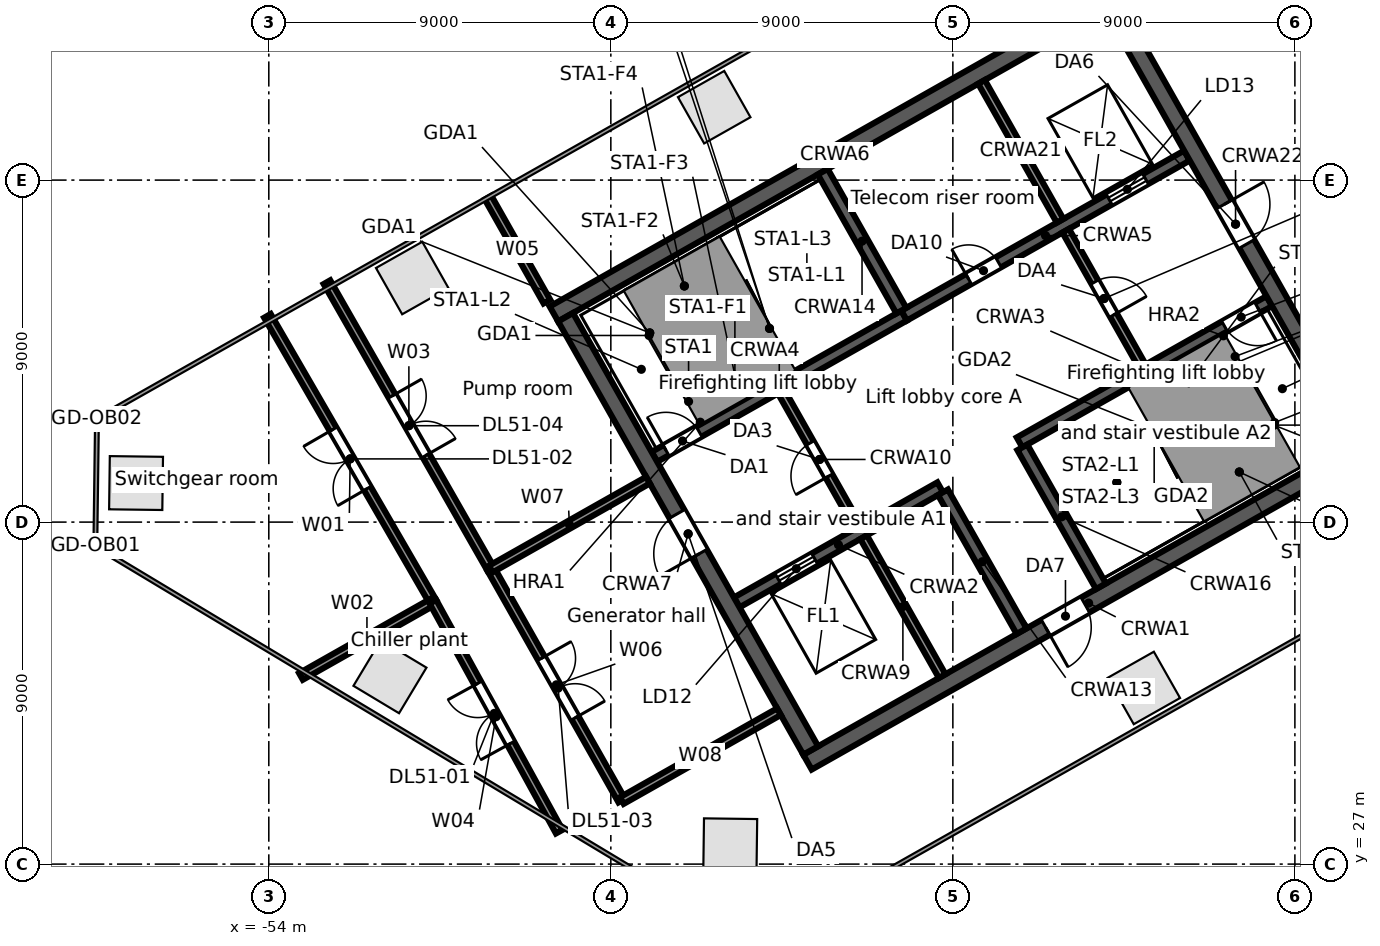
"""IFC4 building model, lengths in metres.
Left out: names, types, materials, properties, quantities, classifications, styles, units other than length and angle.
Written with IfcOpenShell. Run it as: python <this file> out.ifc"""

import sys

from ifc_helpers import new_model, si_unit, direction, frame, frame_2d, origin, origin_2d, place, context, subcontext, project, spatial, rectangle, extrude, element, fill, save


model = new_model("IFC4")
c1 = context("Model", 3, precision=1e-05, world=origin(), true_north=direction((0.0, 1.0)))
c2 = subcontext(c1, "Body", "Model", "MODEL_VIEW")
j1 = project(units=[si_unit("LENGTHUNIT", "METRE"), si_unit("PLANEANGLEUNIT", "RADIAN")], contexts=[c1])
p1 = place(None, origin())
s1 = spatial("IfcSite", under=j1, at=p1, CompositionType="ELEMENT")
p2 = place(p1, origin())
s2 = spatial("IfcBuilding", under=s1, at=p2, CompositionType="ELEMENT")
p3 = place(p2, frame((0.0, 0.0, 230.9)))
s3 = spatial("IfcBuildingStorey", under=s2, at=p3, CompositionType="ELEMENT", Elevation=230.9)
for number, where, z_axis, x_axis in (
    (1, (-42.28, 46.919, 0.0), (0.0, 0.0, 1.0), (-0.87, -0.492, 0.0)),
    (2, (-50.226, 42.423, 0.0), (0.0, 0.0, 1.0), (-0.87, -0.492, 0.0)),
    (3, (-57.493, 37.027, 0.0), (0.0, 0.0, 1.0), (-0.013, -1.0, 0.0)),
    (4, (-50.812, 31.931, 0.0), (0.0, 0.0, 1.0), (0.857, -0.515, 0.0)),
    (5, (-41.858, 27.495, 0.0), (0.0, 0.0, 1.0), (1.0, -0.013, 0.0)),
    (6, (-30.976, 31.635, 0.0), (0.0, 0.0, 1.0), (0.87, 0.492, 0.0)),
):
    element("IfcColumn", number, at=place(p3, frame(where, z_axis=z_axis, x_axis=x_axis)), inside=s3, PredefinedType="COLUMN", context=c2, shape_type="SweptSolid", body=[
        extrude(rectangle(XDim=1.4, YDim=1.4, at=origin_2d()), origin(), (0.0, 0.0, 1.0), 7.8),
    ])
p4 = place(p3, frame((-39.825, 29.684, 0.0), z_axis=(0.0, 0.0, 1.0), x_axis=(0.870353598469, 0.492427267353, 0.0)))
e7 = element("IfcWall", 7, at=p4, inside=s3, PredefinedType="SOLIDWALL", context=c2, shape_type="SweptSolid", body=[
    extrude(rectangle(XDim=17.0, YDim=0.45, at=frame_2d((8.5, 0.0))), origin(), (0.0, 0.0, 1.0), 7.52),
])
p5 = place(p4, frame((7.2, 0.0, 0.0)))
e8 = element("IfcOpeningElement", 8, at=p5, cuts=e7, PredefinedType="OPENING", context=c2, shape_type="SweptSolid", body=[
    extrude(rectangle(XDim=1.2, YDim=2.1, at=frame_2d((0.6, 1.05))), frame((0.0, 0.235, 0.0), z_axis=(0.0, -1.0, 0.0), x_axis=(1.0, 0.0, 0.0)), (0.0, 0.0, 1.0), 0.47),
])
p6 = place(p3, frame((-41.687, 33.887, 0.0), z_axis=(0.0, 0.0, 1.0), x_axis=(0.870355736587, 0.49242348826, 0.0)))
e9 = element("IfcWall", 9, at=p6, inside=s3, PredefinedType="SOLIDWALL", context=c2, shape_type="SweptSolid", body=[
    extrude(rectangle(XDim=6.15, YDim=0.3, at=frame_2d((3.075, 0.0))), origin(), (0.0, 0.0, 1.0), 7.52),
])
p7 = place(p6, frame((1.25, 0.0, 0.0)))
e10 = element("IfcOpeningElement", 10, at=p7, cuts=e9, PredefinedType="OPENING", context=c2, shape_type="SweptSolid", body=[
    extrude(rectangle(XDim=1.1, YDim=2.1, at=frame_2d((0.55, 1.05))), frame((0.0, 0.16, 0.0), z_axis=(0.0, -1.0, 0.0), x_axis=(1.0, 0.0, 0.0)), (0.0, 0.0, 1.0), 0.32),
])
p8 = place(p3, frame((-34.245, 38.097, 0.0), z_axis=(0.0, 0.0, 1.0), x_axis=(0.870360409231, 0.492415229297, 0.0)))
e11 = element("IfcWall", 11, at=p8, inside=s3, PredefinedType="SOLIDWALL", context=c2, shape_type="SweptSolid", body=[
    extrude(rectangle(XDim=7.55, YDim=0.3, at=frame_2d((3.775, 0.0))), origin(), (0.0, 0.0, 1.0), 7.52),
])
p9 = place(p8, frame((6.2, 0.0, 0.0)))
e12 = element("IfcOpeningElement", 12, at=p9, cuts=e11, PredefinedType="OPENING", context=c2, shape_type="SweptSolid", body=[
    extrude(rectangle(XDim=1.0, YDim=2.1, at=frame_2d((0.5, 1.05))), frame((0.0, 0.16, 0.0), z_axis=(0.0, -1.0, 0.0), x_axis=(1.0, 0.0, 0.0)), (0.0, 0.0, 1.0), 0.32),
])
p10 = place(p3, frame((-43.853, 37.717, 0.0), z_axis=(0.0, 0.0, 1.0), x_axis=(0.870360409231, 0.492415229297, 0.0)))
e13 = element("IfcWall", 13, at=p10, inside=s3, PredefinedType="SOLIDWALL", context=c2, shape_type="SweptSolid", body=[
    extrude(rectangle(XDim=7.55, YDim=0.3, at=frame_2d((3.775, 0.0))), origin(), (0.0, 0.0, 1.0), 7.52),
])
p11 = place(p10, frame((0.35, 0.0, 0.0)))
e14 = element("IfcOpeningElement", 14, at=p11, cuts=e13, PredefinedType="OPENING", context=c2, shape_type="SweptSolid", body=[
    extrude(rectangle(XDim=1.0, YDim=2.1, at=frame_2d((0.5, 1.05))), frame((0.0, 0.16, 0.0), z_axis=(0.0, -1.0, 0.0), x_axis=(1.0, 0.0, 0.0)), (0.0, 0.0, 1.0), 0.32),
])
p12 = place(p3, frame((-37.282, 41.435, 0.0), z_axis=(0.0, 0.0, 1.0), x_axis=(0.870352688754, 0.492428875248, 0.0)))
e15 = element("IfcWall", 15, at=p12, inside=s3, PredefinedType="SOLIDWALL", context=c2, shape_type="SweptSolid", body=[
    extrude(rectangle(XDim=8.55, YDim=0.3, at=frame_2d((4.275, 0.0))), origin(), (0.0, 0.0, 1.0), 7.52),
])
p13 = place(p12, frame((6.2, 0.0, 0.0)))
e16 = element("IfcOpeningElement", 16, at=p13, cuts=e15, PredefinedType="OPENING", context=c2, shape_type="SweptSolid", body=[
    extrude(rectangle(XDim=1.1, YDim=2.1, at=frame_2d((0.55, 1.05))), frame((0.0, 0.16, 0.0), z_axis=(0.0, -1.0, 0.0), x_axis=(1.0, 0.0, 0.0)), (0.0, 0.0, 1.0), 0.32),
])
p14 = place(p12, frame((1.95, 0.0, 0.0)))
e17 = element("IfcOpeningElement", 17, at=p14, cuts=e15, PredefinedType="OPENING", context=c2, shape_type="SweptSolid", body=[
    extrude(rectangle(XDim=0.9, YDim=2.1, at=frame_2d((0.45, 1.05))), frame((0.0, 0.16, 0.0), z_axis=(0.0, -1.0, 0.0), x_axis=(1.0, 0.0, 0.0)), (0.0, 0.0, 1.0), 0.32),
])
p15 = place(p3, frame((-46.498, 41.477, 0.0), z_axis=(0.0, 0.0, 1.0), x_axis=(0.870359753402, 0.492416388494, 0.0)))
e18 = element("IfcWall", 18, at=p15, inside=s3, PredefinedType="SOLIDWALL", context=c2, shape_type="SweptSolid", body=[
    extrude(rectangle(XDim=17.0, YDim=0.45, at=frame_2d((8.5, 0.0))), origin(), (0.0, 0.0, 1.0), 7.52),
])
p16 = place(p3, frame((-46.191, 41.392, 0.0), z_axis=(0.0, 0.0, 1.0), x_axis=(0.492421378713, -0.870356930107, 0.0)))
e19 = element("IfcWall", 19, at=p16, inside=s3, PredefinedType="SOLIDWALL", context=c2, shape_type="SweptSolid", body=[
    extrude(rectangle(XDim=13.1, YDim=0.45, at=frame_2d((6.55, 0.0))), origin(), (0.0, 0.0, 1.0), 7.52),
])
p17 = place(p16, frame((5.95, 0.0, 0.0)))
e20 = element("IfcOpeningElement", 20, at=p17, cuts=e19, PredefinedType="OPENING", context=c2, shape_type="SweptSolid", body=[
    extrude(rectangle(XDim=1.2, YDim=2.1, at=frame_2d((0.6, 1.05))), frame((0.0, 0.235, 0.0), z_axis=(0.0, -1.0, 0.0), x_axis=(1.0, 0.0, 0.0)), (0.0, 0.0, 1.0), 0.47),
])
p18 = place(p3, frame((-38.349, 35.603, 0.0), z_axis=(0.0, 0.0, 1.0), x_axis=(0.492409653846, -0.870363563575, 0.0)))
e21 = element("IfcWall", 21, at=p18, inside=s3, PredefinedType="SOLIDWALL", context=c2, shape_type="SweptSolid", body=[
    extrude(rectangle(XDim=4.2, YDim=0.2, at=frame_2d((2.1, 0.0))), origin(), (0.0, 0.0, 1.0), 7.52),
])
p19 = place(p3, frame((-40.516, 39.433, 0.0), z_axis=(0.0, 0.0, 1.0), x_axis=(0.492453559952, -0.87033872216, 0.0)))
e22 = element("IfcWall", 22, at=p19, inside=s3, PredefinedType="PARTITIONING", context=c2, shape_type="SweptSolid", body=[
    extrude(rectangle(XDim=4.1, YDim=0.2, at=frame_2d((2.05, 0.0))), origin(), (0.0, 0.0, 1.0), 7.52),
])
p20 = place(p19, frame((1.55, 0.0, 0.0)))
e23 = element("IfcOpeningElement", 23, at=p20, cuts=e22, PredefinedType="OPENING", context=c2, shape_type="SweptSolid", body=[
    extrude(rectangle(XDim=1.0, YDim=2.1, at=frame_2d((0.5, 1.05))), frame((0.0, 0.11, 0.0), z_axis=(0.0, -1.0, 0.0), x_axis=(1.0, 0.0, 0.0)), (0.0, 0.0, 1.0), 0.22),
])
for number, where, z_axis, x_axis in (
    (24, (-36.26, 36.785, 0.0), (0.0, 0.0, 1.0), (0.492, -0.87, 0.0)),
    (25, (-39.424, 45.22, 0.0), (0.0, 0.0, 1.0), (0.492, -0.87, 0.0)),
    (26, (-34.171, 37.967, 0.0), (0.0, 0.0, 1.0), (0.492, -0.87, 0.0)),
):
    element("IfcWall", number, at=place(p3, frame(where, z_axis=z_axis, x_axis=x_axis)), inside=s3, PredefinedType="SOLIDWALL", context=c2, shape_type="SweptSolid", body=[
        extrude(rectangle(XDim=4.2, YDim=0.3, at=frame_2d((2.1, 0.0))), origin(), (0.0, 0.0, 1.0), 7.52),
    ])
p21 = place(p3, frame((-33.031, 43.667, 0.0), z_axis=(0.0, 0.0, 1.0), x_axis=(0.492408451753, -0.87036424366, 0.0)))
e27 = element("IfcWall", 27, at=p21, inside=s3, PredefinedType="PARTITIONING", context=c2, shape_type="SweptSolid", body=[
    extrude(rectangle(XDim=4.1, YDim=0.2, at=frame_2d((2.05, 0.0))), origin(), (0.0, 0.0, 1.0), 7.52),
])
p22 = place(p21, frame((1.55, 0.0, 0.0)))
e28 = element("IfcOpeningElement", 28, at=p22, cuts=e27, PredefinedType="OPENING", context=c2, shape_type="SweptSolid", body=[
    extrude(rectangle(XDim=1.0, YDim=2.1, at=frame_2d((0.5, 1.05))), frame((0.0, 0.11, 0.0), z_axis=(0.0, -1.0, 0.0), x_axis=(1.0, 0.0, 0.0)), (0.0, 0.0, 1.0), 0.22),
])
p23 = place(p3, frame((-35.246, 47.584, 0.0), z_axis=(0.0, 0.0, 1.0), x_axis=(0.492409653846, -0.870363563575, 0.0)))
e29 = element("IfcWall", 29, at=p23, inside=s3, PredefinedType="SOLIDWALL", context=c2, shape_type="SweptSolid", body=[
    extrude(rectangle(XDim=4.2, YDim=0.2, at=frame_2d((2.1, 0.0))), origin(), (0.0, 0.0, 1.0), 7.52),
])
p24 = place(p3, frame((-31.787, 49.542, 0.0), z_axis=(0.0, 0.0, 1.0), x_axis=(0.492421378713, -0.870356930107, 0.0)))
e30 = element("IfcWall", 30, at=p24, inside=s3, PredefinedType="SOLIDWALL", context=c2, shape_type="SweptSolid", body=[
    extrude(rectangle(XDim=13.1, YDim=0.45, at=frame_2d((6.55, 0.0))), origin(), (0.0, 0.0, 1.0), 7.52),
])
p25 = place(p24, frame((5.95, 0.0, 0.0)))
e31 = element("IfcOpeningElement", 31, at=p25, cuts=e30, PredefinedType="OPENING", context=c2, shape_type="SweptSolid", body=[
    extrude(rectangle(XDim=1.2, YDim=2.1, at=frame_2d((0.6, 1.05))), frame((0.0, 0.235, 0.0), z_axis=(0.0, -1.0, 0.0), x_axis=(1.0, 0.0, 0.0)), (0.0, 0.0, 1.0), 0.47),
])
p26 = place(p3, frame((-54.036, 41.428, 0.0), z_axis=(0.0, 0.0, 1.0), x_axis=(0.500903434797, -0.865503176775, 0.0)))
e32 = element("IfcWall", 32, at=p26, inside=s3, PredefinedType="PARTITIONING", context=c2, shape_type="SweptSolid", body=[
    extrude(rectangle(XDim=8.694, YDim=0.2, at=frame_2d((4.347, 0.0))), origin(), (0.0, 0.0, 1.0), 6.894),
])
p27 = place(p26, frame((3.45, 0.0, 0.0)))
e33 = element("IfcOpeningElement", 33, at=p27, cuts=e32, PredefinedType="OPENING", context=c2, shape_type="SweptSolid", body=[
    extrude(rectangle(XDim=1.8, YDim=2.1, at=frame_2d((0.9, 1.05))), frame((0.0, 0.11, 0.0), z_axis=(0.0, -1.0, 0.0), x_axis=(1.0, 0.0, 0.0)), (0.0, 0.0, 1.0), 0.22),
])
p28 = place(p3, frame((-53.154, 31.938, 0.0), z_axis=(0.0, 0.0, 1.0), x_axis=(0.870347398057, 0.492438226273, 0.0)))
e34 = element("IfcWall", 34, at=p28, inside=s3, PredefinedType="PARTITIONING", context=c2, shape_type="SweptSolid", body=[
    extrude(rectangle(XDim=3.99, YDim=0.2, at=frame_2d((1.995, 0.0))), origin(), (0.0, 0.0, 1.0), 6.9),
])
p29 = place(p3, frame((-52.47, 42.314, 0.0), z_axis=(0.0, 0.0, 1.0), x_axis=(0.495939345118, -0.868357164975, 0.0)))
e35 = element("IfcWall", 35, at=p29, inside=s3, PredefinedType="PARTITIONING", context=c2, shape_type="SweptSolid", body=[
    extrude(rectangle(XDim=8.695, YDim=0.2, at=frame_2d((4.347, 0.0))), origin(), (0.0, 0.0, 1.0), 6.894),
])
p30 = place(p29, frame((3.45, 0.0, 0.0)))
e36 = element("IfcOpeningElement", 36, at=p30, cuts=e35, PredefinedType="OPENING", context=c2, shape_type="SweptSolid", body=[
    extrude(rectangle(XDim=1.8, YDim=2.1, at=frame_2d((0.9, 1.05))), frame((0.0, 0.11, 0.0), z_axis=(0.0, -1.0, 0.0), x_axis=(1.0, 0.0, 0.0)), (0.0, 0.0, 1.0), 0.22),
])
p31 = place(p3, frame((-49.681, 33.903, 0.0), z_axis=(0.0, 0.0, 1.0), x_axis=(0.48158332994, -0.876400305981, 0.0)))
e37 = element("IfcWall", 37, at=p31, inside=s3, PredefinedType="PARTITIONING", context=c2, shape_type="SweptSolid", body=[
    extrude(rectangle(XDim=6.902, YDim=0.2, at=frame_2d((3.451, 0.0))), origin(), (0.0, 0.0, 1.0), 6.8),
])
p32 = place(p31, frame((2.45, 0.0, 0.0)))
e38 = element("IfcOpeningElement", 38, at=p32, cuts=e37, PredefinedType="OPENING", context=c2, shape_type="SweptSolid", body=[
    extrude(rectangle(XDim=1.8, YDim=2.1, at=frame_2d((0.9, 1.05))), frame((0.0, 0.11, 0.0), z_axis=(0.0, -1.0, 0.0), x_axis=(1.0, 0.0, 0.0)), (0.0, 0.0, 1.0), 0.22),
])
p33 = place(p3, frame((-48.231, 44.54, 0.0), z_axis=(0.0, 0.0, 1.0), x_axis=(0.49254830201, -0.870285108563, 0.0)))
e39 = element("IfcWall", 39, at=p33, inside=s3, PredefinedType="PARTITIONING", context=c2, shape_type="SweptSolid", body=[
    extrude(rectangle(XDim=3.145, YDim=0.2, at=frame_2d((1.573, 0.0))), origin(), (0.0, 0.0, 1.0), 6.888),
])
p34 = place(p3, frame((-48.158, 34.764, 0.0), z_axis=(0.0, 0.0, 1.0), x_axis=(0.492472114048, -0.870328223652, 0.0)))
e40 = element("IfcWall", 40, at=p34, inside=s3, PredefinedType="PARTITIONING", context=c2, shape_type="SweptSolid", body=[
    extrude(rectangle(XDim=7.0, YDim=0.2, at=frame_2d((3.5, 0.0))), origin(), (0.0, 0.0, 1.0), 6.8),
])
p35 = place(p34, frame((2.7, 0.0, 0.0)))
e41 = element("IfcOpeningElement", 41, at=p35, cuts=e40, PredefinedType="OPENING", context=c2, shape_type="SweptSolid", body=[
    extrude(rectangle(XDim=1.8, YDim=2.1, at=frame_2d((0.9, 1.05))), frame((0.0, 0.11, 0.0), z_axis=(0.0, -1.0, 0.0), x_axis=(1.0, 0.0, 0.0)), (0.0, 0.0, 1.0), 0.22),
])
for number, where, z_axis, x_axis in (
    (42, (-48.158, 34.764, 0.0), (0.0, 0.0, 1.0), (0.87, 0.492, 0.0)),
    (43, (-44.711, 28.672, 0.0), (0.0, 0.0, 1.0), (0.87, 0.492, 0.0)),
):
    element("IfcWall", number, at=place(p3, frame(where, z_axis=z_axis, x_axis=x_axis)), inside=s3, PredefinedType="PARTITIONING", context=c2, shape_type="SweptSolid", body=[
        extrude(rectangle(XDim=4.751, YDim=0.2, at=frame_2d((2.375, 0.0))), origin(), (0.0, 0.0, 1.0), 6.8),
    ])
p36 = place(p13, origin())
e44 = element("IfcDoor", 44, at=p36, inside=s3, OperationType="DOUBLE_DOOR_SLIDING", PredefinedType="DOOR", context=c2, shape_type="SweptSolid", body=[
    extrude(rectangle(XDim=1.1, YDim=2.1, at=frame_2d((0.55, 1.05))), frame((0.0, 0.025, 0.0), z_axis=(0.0, -1.0, 0.0), x_axis=(1.0, 0.0, 0.0)), (0.0, 0.0, 1.0), 0.05),
])
fill(e16, e44)
p37 = place(p7, origin())
e45 = element("IfcDoor", 45, at=p37, inside=s3, OperationType="DOUBLE_DOOR_SLIDING", PredefinedType="DOOR", context=c2, shape_type="SweptSolid", body=[
    extrude(rectangle(XDim=1.1, YDim=2.1, at=frame_2d((0.55, 1.05))), frame((0.0, 0.025, 0.0), z_axis=(0.0, -1.0, 0.0), x_axis=(1.0, 0.0, 0.0)), (0.0, 0.0, 1.0), 0.05),
])
fill(e10, e45)
p38 = place(p11, origin())
e46 = element("IfcDoor", 46, at=p38, inside=s3, OperationType="SINGLE_SWING_LEFT", PredefinedType="DOOR", context=c2, shape_type="SweptSolid", body=[
    extrude(rectangle(XDim=1.0, YDim=2.1, at=frame_2d((0.5, 1.05))), frame((0.0, 0.025, 0.0), z_axis=(0.0, -1.0, 0.0), x_axis=(1.0, 0.0, 0.0)), (0.0, 0.0, 1.0), 0.05),
])
fill(e14, e46)
p39 = place(p9, frame((1.0, 0.0, 0.0), z_axis=(0.0, 0.0, 1.0), x_axis=(-1.0, 0.0, 0.0)))
e47 = element("IfcDoor", 47, at=p39, inside=s3, OperationType="SINGLE_SWING_LEFT", PredefinedType="DOOR", context=c2, shape_type="SweptSolid", body=[
    extrude(rectangle(XDim=1.0, YDim=2.1, at=frame_2d((0.5, 1.05))), frame((0.0, 0.025, 0.0), z_axis=(0.0, -1.0, 0.0), x_axis=(1.0, 0.0, 0.0)), (0.0, 0.0, 1.0), 0.05),
])
fill(e12, e47)
p40 = place(p20, frame((1.0, 0.0, 0.0), z_axis=(0.0, 0.0, 1.0), x_axis=(-1.0, 0.0, 0.0)))
e48 = element("IfcDoor", 48, at=p40, inside=s3, OperationType="SINGLE_SWING_LEFT", PredefinedType="DOOR", context=c2, shape_type="SweptSolid", body=[
    extrude(rectangle(XDim=1.0, YDim=2.1, at=frame_2d((0.5, 1.05))), frame((0.0, 0.025, 0.0), z_axis=(0.0, -1.0, 0.0), x_axis=(1.0, 0.0, 0.0)), (0.0, 0.0, 1.0), 0.05),
])
fill(e23, e48)
p41 = place(p17, frame((1.2, 0.0, 0.0), z_axis=(0.0, 0.0, 1.0), x_axis=(-1.0, 0.0, 0.0)))
e49 = element("IfcDoor", 49, at=p41, inside=s3, OperationType="SINGLE_SWING_LEFT", PredefinedType="DOOR", context=c2, shape_type="SweptSolid", body=[
    extrude(rectangle(XDim=1.2, YDim=2.1, at=frame_2d((0.6, 1.05))), frame((0.0, 0.025, 0.0), z_axis=(0.0, -1.0, 0.0), x_axis=(1.0, 0.0, 0.0)), (0.0, 0.0, 1.0), 0.05),
])
fill(e20, e49)
p42 = place(p22, origin())
e50 = element("IfcDoor", 50, at=p42, inside=s3, OperationType="SINGLE_SWING_RIGHT", PredefinedType="DOOR", context=c2, shape_type="SweptSolid", body=[
    extrude(rectangle(XDim=1.0, YDim=2.1, at=frame_2d((0.5, 1.05))), frame((0.0, 0.025, 0.0), z_axis=(0.0, -1.0, 0.0), x_axis=(1.0, 0.0, 0.0)), (0.0, 0.0, 1.0), 0.05),
])
fill(e28, e50)
p43 = place(p25, origin())
e51 = element("IfcDoor", 51, at=p43, inside=s3, OperationType="SINGLE_SWING_LEFT", PredefinedType="DOOR", context=c2, shape_type="SweptSolid", body=[
    extrude(rectangle(XDim=1.2, YDim=2.1, at=frame_2d((0.6, 1.05))), frame((0.0, 0.025, 0.0), z_axis=(0.0, -1.0, 0.0), x_axis=(1.0, 0.0, 0.0)), (0.0, 0.0, 1.0), 0.05),
])
fill(e31, e51)
p44 = place(p5, frame((1.2, 0.0, 0.0), z_axis=(0.0, 0.0, 1.0), x_axis=(-1.0, 0.0, 0.0)))
e52 = element("IfcDoor", 52, at=p44, inside=s3, OperationType="SINGLE_SWING_RIGHT", PredefinedType="DOOR", context=c2, shape_type="SweptSolid", body=[
    extrude(rectangle(XDim=1.2, YDim=2.1, at=frame_2d((0.6, 1.05))), frame((0.0, 0.025, 0.0), z_axis=(0.0, -1.0, 0.0), x_axis=(1.0, 0.0, 0.0)), (0.0, 0.0, 1.0), 0.05),
])
fill(e8, e52)
p45 = place(p14, origin())
e53 = element("IfcDoor", 53, at=p45, inside=s3, OperationType="SINGLE_SWING_LEFT", PredefinedType="DOOR", context=c2, shape_type="SweptSolid", body=[
    extrude(rectangle(XDim=0.9, YDim=2.1, at=frame_2d((0.45, 1.05))), frame((0.0, 0.025, 0.0), z_axis=(0.0, -1.0, 0.0), x_axis=(1.0, 0.0, 0.0)), (0.0, 0.0, 1.0), 0.05),
])
fill(e17, e53)
p46 = place(p32, frame((1.8, 0.0, 0.0), z_axis=(0.0, 0.0, 1.0), x_axis=(-1.0, 0.0, 0.0)))
e54 = element("IfcDoor", 54, at=p46, inside=s3, OperationType="DOUBLE_DOOR_SINGLE_SWING", PredefinedType="DOOR", context=c2, shape_type="SweptSolid", body=[
    extrude(rectangle(XDim=1.8, YDim=2.1, at=frame_2d((0.9, 1.05))), frame((0.0, 0.025, 0.0), z_axis=(0.0, -1.0, 0.0), x_axis=(1.0, 0.0, 0.0)), (0.0, 0.0, 1.0), 0.05),
])
fill(e38, e54)
p47 = place(p27, frame((1.8, 0.0, 0.0), z_axis=(0.0, 0.0, 1.0), x_axis=(-1.0, 0.0, 0.0)))
e55 = element("IfcDoor", 55, at=p47, inside=s3, OperationType="DOUBLE_DOOR_SINGLE_SWING", PredefinedType="DOOR", context=c2, shape_type="SweptSolid", body=[
    extrude(rectangle(XDim=1.8, YDim=2.1, at=frame_2d((0.9, 1.05))), frame((0.0, 0.025, 0.0), z_axis=(0.0, -1.0, 0.0), x_axis=(1.0, 0.0, 0.0)), (0.0, 0.0, 1.0), 0.05),
])
fill(e33, e55)
p48 = place(p35, origin())
e56 = element("IfcDoor", 56, at=p48, inside=s3, OperationType="DOUBLE_DOOR_SINGLE_SWING", PredefinedType="DOOR", context=c2, shape_type="SweptSolid", body=[
    extrude(rectangle(XDim=1.8, YDim=2.1, at=frame_2d((0.9, 1.05))), frame((0.0, 0.025, 0.0), z_axis=(0.0, -1.0, 0.0), x_axis=(1.0, 0.0, 0.0)), (0.0, 0.0, 1.0), 0.05),
])
fill(e41, e56)
p49 = place(p30, origin())
e57 = element("IfcDoor", 57, at=p49, inside=s3, OperationType="DOUBLE_DOOR_SINGLE_SWING", PredefinedType="DOOR", context=c2, shape_type="SweptSolid", body=[
    extrude(rectangle(XDim=1.8, YDim=2.1, at=frame_2d((0.9, 1.05))), frame((0.0, 0.025, 0.0), z_axis=(0.0, -1.0, 0.0), x_axis=(1.0, 0.0, 0.0)), (0.0, 0.0, 1.0), 0.05),
])
fill(e36, e57)
save(model, sys.argv[1])
